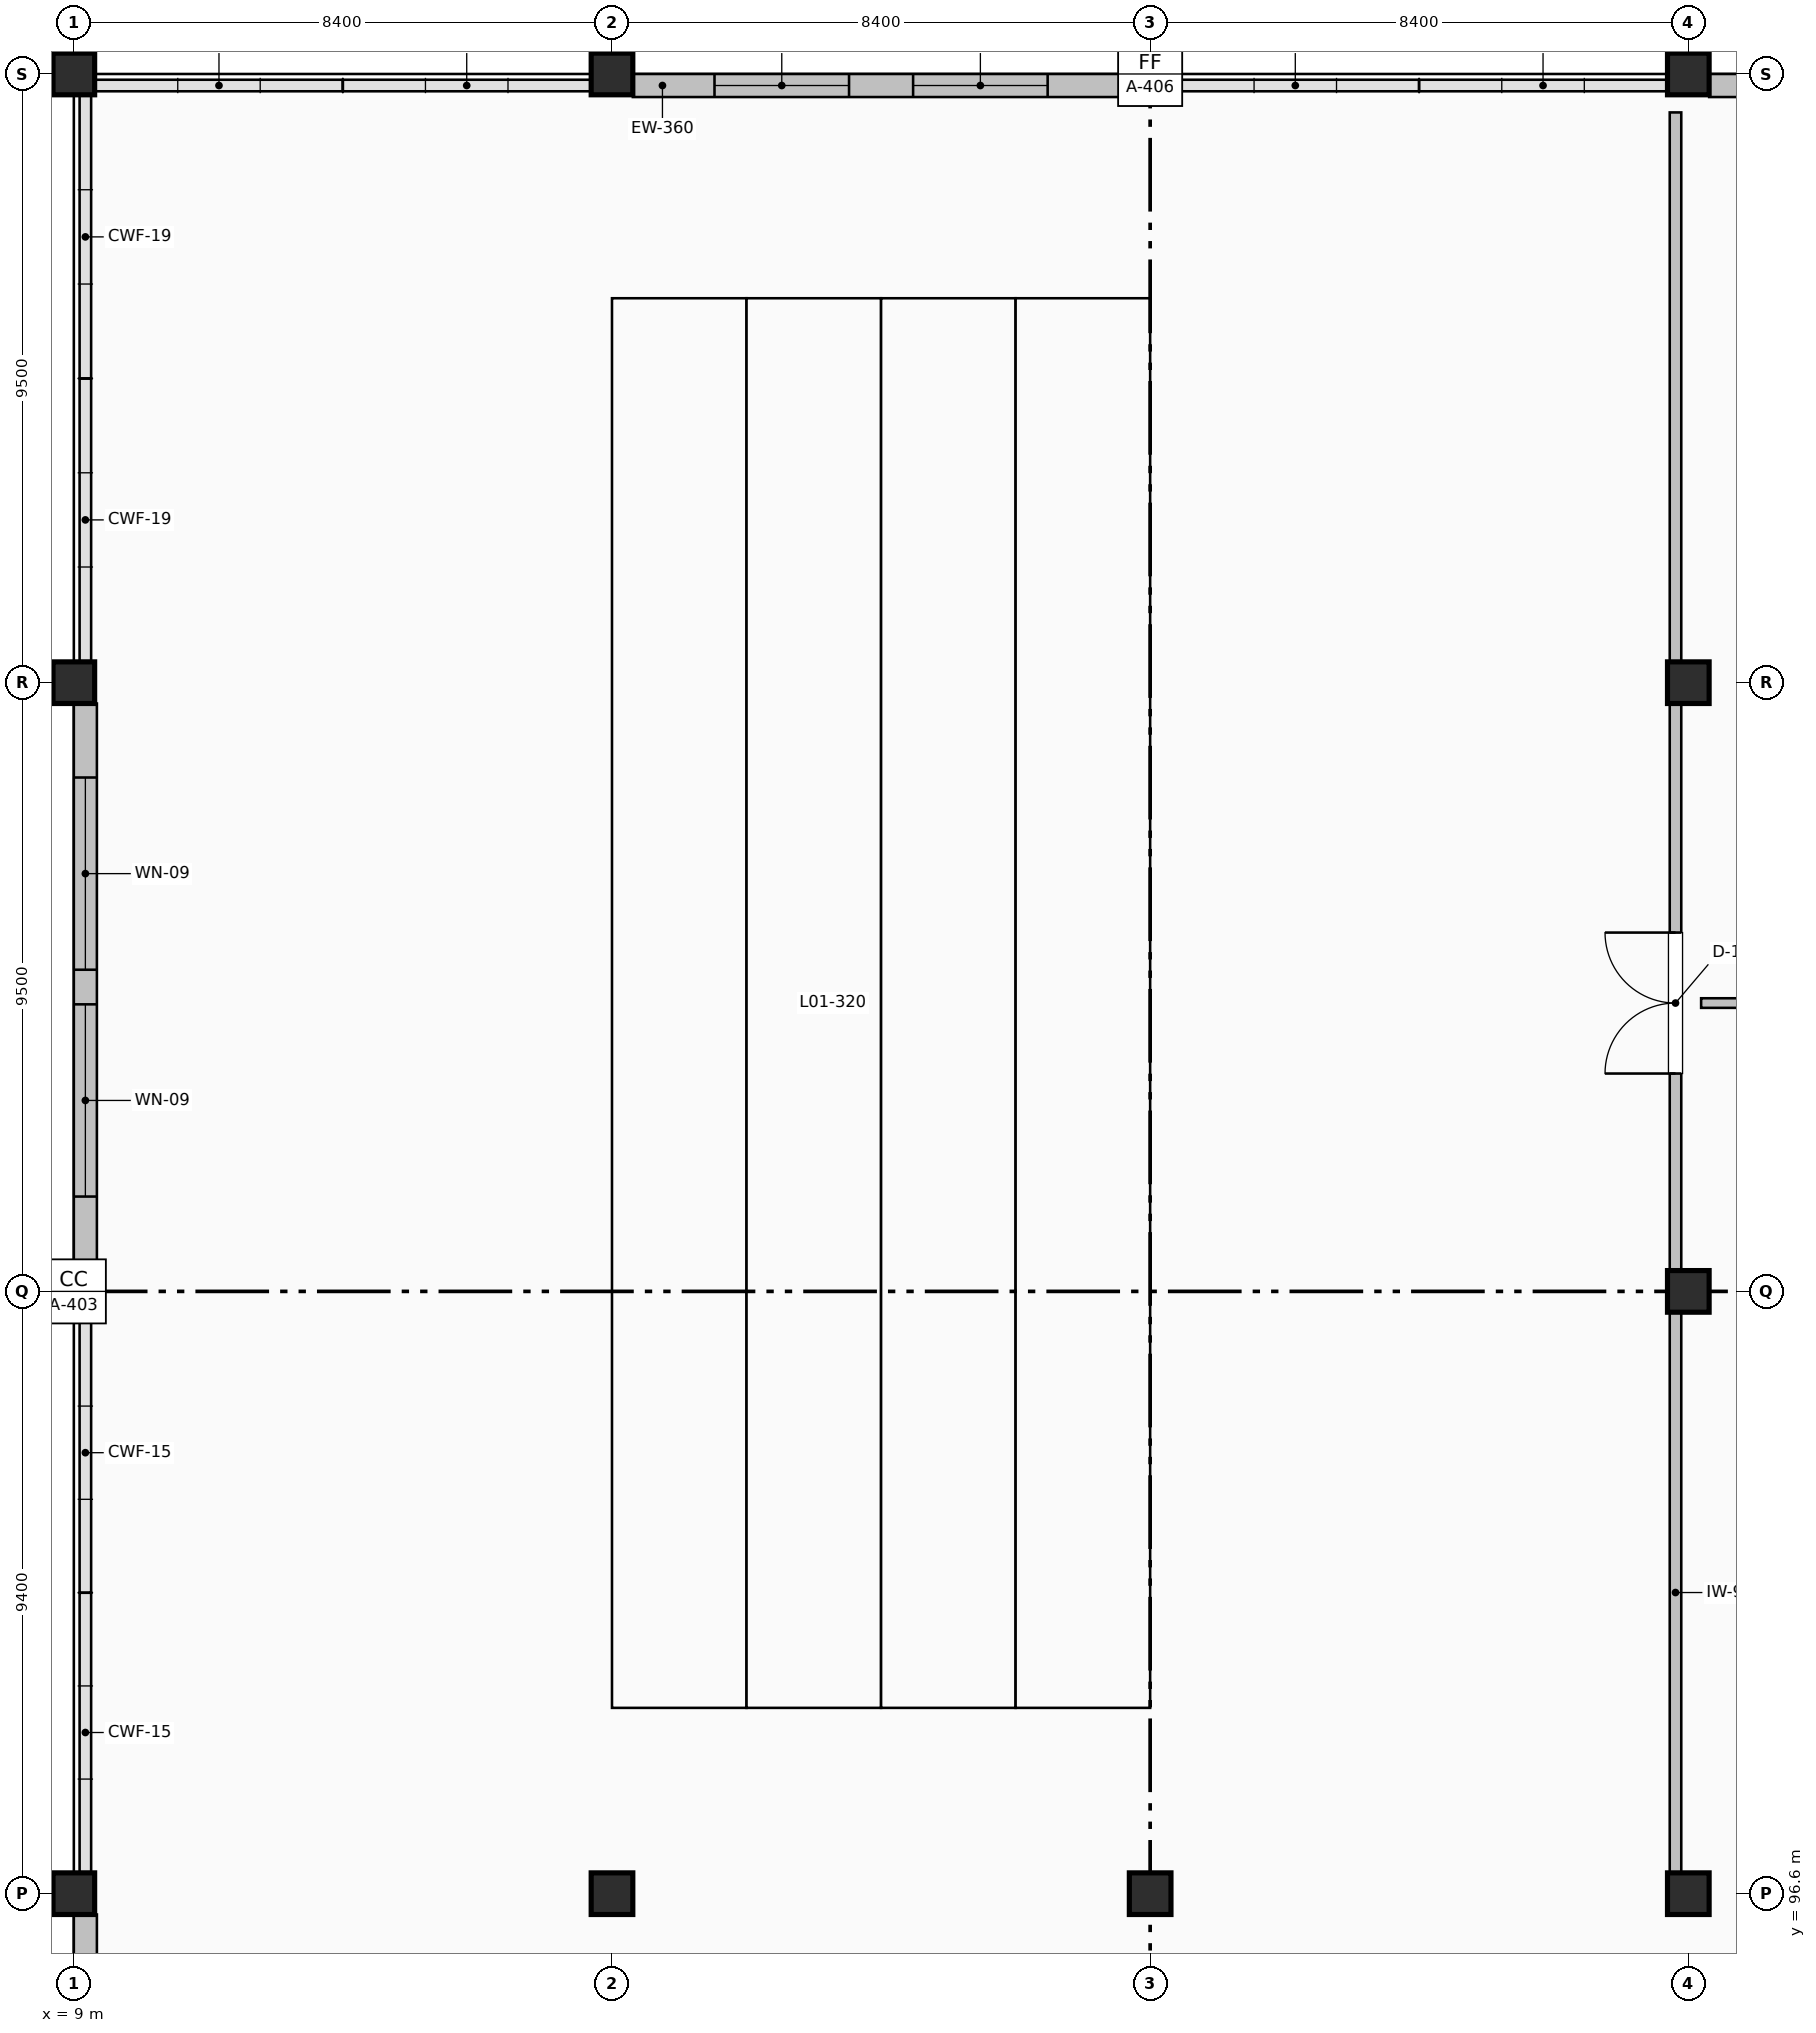
"""IFC4 building model, lengths in metres.
Left out: names, types, materials, properties, quantities, classifications, styles, units other than length and angle.
Written with IfcOpenShell. Run it as: python <this file> out.ifc"""

import sys

from ifc_helpers import new_model, si_unit, direction, frame, frame_2d, origin, origin_2d, place, context, subcontext, project, spatial, rectangle, extrude, element, fill, save


model = new_model("IFC4")
c1 = context("Model", 3, precision=1e-05, world=origin(), true_north=direction((0.0, 1.0)))
c2 = subcontext(c1, "Body", "Model", "MODEL_VIEW")
j1 = project(units=[si_unit("LENGTHUNIT", "METRE"), si_unit("PLANEANGLEUNIT", "RADIAN")], contexts=[c1])
p1 = place(None, origin())
s1 = spatial("IfcSite", under=j1, at=p1, CompositionType="ELEMENT")
p2 = place(p1, origin())
s2 = spatial("IfcBuilding", under=s1, at=p2, CompositionType="ELEMENT")
p3 = place(p2, frame((0.0, 0.0, 5.4)))
s3 = spatial("IfcBuildingStorey", under=s2, at=p3, CompositionType="ELEMENT", Elevation=5.4)
for number, where, z_axis, x_axis in (
    (1, (9.0, 96.6, 0.0), (0.0, 0.0, 1.0), (1.0, 0.0, 0.0)),
    (2, (9.0, 106.0, 0.0), (0.0, 0.0, 1.0), (1.0, 0.0, 0.0)),
    (3, (9.0, 115.5, 0.0), (0.0, 0.0, 1.0), (1.0, 0.0, 0.0)),
    (4, (9.0, 125.0, 0.0), (0.0, 0.0, 1.0), (1.0, 0.0, 0.0)),
    (5, (17.4, 96.6, 0.0), (0.0, 0.0, 1.0), (1.0, 0.0, 0.0)),
    (6, (17.4, 125.0, 0.0), (0.0, 0.0, 1.0), (1.0, 0.0, 0.0)),
    (7, (25.8, 96.6, 0.0), (0.0, 0.0, 1.0), (1.0, 0.0, 0.0)),
    (8, (25.8, 125.0, 0.0), (0.0, 0.0, 1.0), (1.0, 0.0, 0.0)),
    (9, (34.2, 96.6, 0.0), (0.0, 0.0, 1.0), (1.0, 0.0, 0.0)),
    (10, (34.2, 106.0, 0.0), (0.0, 0.0, 1.0), (1.0, 0.0, 0.0)),
    (11, (34.2, 115.5, 0.0), (0.0, 0.0, 1.0), (1.0, 0.0, 0.0)),
    (12, (34.2, 125.0, 0.0), (0.0, 0.0, 1.0), (1.0, 0.0, 0.0)),
):
    element("IfcColumn", number, at=place(p3, frame(where, z_axis=z_axis, x_axis=x_axis)), inside=s3, PredefinedType="COLUMN", context=c2, shape_type="SweptSolid", body=[
        extrude(rectangle(XDim=0.65, YDim=0.65, at=origin_2d()), origin(), (0.0, 0.0, 1.0), 4.8),
    ])
p4 = place(p3, frame((17.725, 124.82, 0.0), z_axis=(0.0, 0.0, 1.0), x_axis=(1.0, 0.0, 0.0)))
e13 = element("IfcWall", 13, at=p4, inside=s3, PredefinedType="SOLIDWALL", context=c2, shape_type="SweptSolid", body=[
    extrude(rectangle(XDim=7.75, YDim=0.36, at=frame_2d((3.875, 0.0))), origin(), (0.0, 0.0, 1.0), 3.592),
])
p5 = place(p4, frame((1.275, 0.0, 0.9)))
e14 = element("IfcOpeningElement", 14, at=p5, cuts=e13, PredefinedType="OPENING", context=c2, shape_type="SweptSolid", body=[
    extrude(rectangle(XDim=2.1, YDim=2.1, at=frame_2d((1.05, 1.05))), frame((0.0, 0.19, 0.0), z_axis=(0.0, -1.0, 0.0), x_axis=(1.0, 0.0, 0.0)), (0.0, 0.0, 1.0), 0.38),
])
p6 = place(p4, frame((4.375, 0.0, 0.9)))
e15 = element("IfcOpeningElement", 15, at=p6, cuts=e13, PredefinedType="OPENING", context=c2, shape_type="SweptSolid", body=[
    extrude(rectangle(XDim=2.1, YDim=2.1, at=frame_2d((1.05, 1.05))), frame((0.0, 0.19, 0.0), z_axis=(0.0, -1.0, 0.0), x_axis=(1.0, 0.0, 0.0)), (0.0, 0.0, 1.0), 0.38),
])
p7 = place(p3, frame((34.525, 124.82, 0.0), z_axis=(0.0, 0.0, 1.0), x_axis=(1.0, 0.0, 0.0)))
e16 = element("IfcWall", 16, at=p7, inside=s3, PredefinedType="SOLIDWALL", context=c2, shape_type="SweptSolid", body=[
    extrude(rectangle(XDim=7.75, YDim=0.36, at=frame_2d((3.875, 0.0))), origin(), (0.0, 0.0, 1.0), 3.592),
])
p8 = place(p7, frame((1.575, 0.0, 0.9)))
e17 = element("IfcOpeningElement", 17, at=p8, cuts=e16, PredefinedType="OPENING", context=c2, shape_type="SweptSolid", body=[
    extrude(rectangle(XDim=1.5, YDim=2.1, at=frame_2d((0.75, 1.05))), frame((0.0, 0.19, 0.0), z_axis=(0.0, -1.0, 0.0), x_axis=(1.0, 0.0, 0.0)), (0.0, 0.0, 1.0), 0.38),
])
p9 = place(p7, frame((4.675, 0.0, 0.9)))
e18 = element("IfcOpeningElement", 18, at=p9, cuts=e16, PredefinedType="OPENING", context=c2, shape_type="SweptSolid", body=[
    extrude(rectangle(XDim=1.5, YDim=2.1, at=frame_2d((0.75, 1.05))), frame((0.0, 0.19, 0.0), z_axis=(0.0, -1.0, 0.0), x_axis=(1.0, 0.0, 0.0)), (0.0, 0.0, 1.0), 0.38),
])
p10 = place(p3, frame((9.18, 87.61, 0.0), z_axis=(0.0, 0.0, 1.0), x_axis=(0.0, 1.0, 0.0)))
e19 = element("IfcWall", 19, at=p10, inside=s3, PredefinedType="SOLIDWALL", context=c2, shape_type="SweptSolid", body=[
    extrude(rectangle(XDim=8.665, YDim=0.36, at=frame_2d((4.333, 0.0))), origin(), (0.0, 0.0, 1.0), 3.592),
])
p11 = place(p10, frame((1.25, 0.0, 0.9)))
e20 = element("IfcOpeningElement", 20, at=p11, cuts=e19, PredefinedType="OPENING", context=c2, shape_type="SweptSolid", body=[
    extrude(rectangle(XDim=2.7, YDim=2.1, at=frame_2d((1.35, 1.05))), frame((0.0, 0.19, 0.0), z_axis=(0.0, -1.0, 0.0), x_axis=(1.0, 0.0, 0.0)), (0.0, 0.0, 1.0), 0.38),
])
p12 = place(p10, frame((4.716, 0.0, 0.9)))
e21 = element("IfcOpeningElement", 21, at=p12, cuts=e19, PredefinedType="OPENING", context=c2, shape_type="SweptSolid", body=[
    extrude(rectangle(XDim=2.7, YDim=2.1, at=frame_2d((1.35, 1.05))), frame((0.0, 0.19, 0.0), z_axis=(0.0, -1.0, 0.0), x_axis=(1.0, 0.0, 0.0)), (0.0, 0.0, 1.0), 0.38),
])
p13 = place(p3, frame((9.18, 106.325, 0.0), z_axis=(0.0, 0.0, 1.0), x_axis=(0.0, 1.0, 0.0)))
e22 = element("IfcWall", 22, at=p13, inside=s3, PredefinedType="SOLIDWALL", context=c2, shape_type="SweptSolid", body=[
    extrude(rectangle(XDim=8.85, YDim=0.36, at=frame_2d((4.425, 0.0))), origin(), (0.0, 0.0, 1.0), 3.592),
])
p14 = place(p13, frame((1.155, 0.0, 0.9)))
e23 = element("IfcOpeningElement", 23, at=p14, cuts=e22, PredefinedType="OPENING", context=c2, shape_type="SweptSolid", body=[
    extrude(rectangle(XDim=3.0, YDim=2.1, at=frame_2d((1.5, 1.05))), frame((0.0, 0.19, 0.0), z_axis=(0.0, -1.0, 0.0), x_axis=(1.0, 0.0, 0.0)), (0.0, 0.0, 1.0), 0.38),
])
p15 = place(p13, frame((4.695, 0.0, 0.9)))
e24 = element("IfcOpeningElement", 24, at=p15, cuts=e22, PredefinedType="OPENING", context=c2, shape_type="SweptSolid", body=[
    extrude(rectangle(XDim=3.0, YDim=2.1, at=frame_2d((1.5, 1.05))), frame((0.0, 0.19, 0.0), z_axis=(0.0, -1.0, 0.0), x_axis=(1.0, 0.0, 0.0)), (0.0, 0.0, 1.0), 0.38),
])
p16 = place(p3, frame((34.0, 96.925, 0.0), z_axis=(0.0, 0.0, 1.0), x_axis=(0.0, 1.0, 0.0)))
e25 = element("IfcWall", 25, at=p16, inside=s3, PredefinedType="PARTITIONING", context=c2, shape_type="SweptSolid", body=[
    extrude(rectangle(XDim=8.75, YDim=0.18, at=frame_2d((4.375, 0.0))), origin(), (0.0, 0.0, 1.0), 3.592),
])
p17 = place(p3, frame((34.0, 106.325, 0.0), z_axis=(0.0, 0.0, 1.0), x_axis=(0.0, 1.0, 0.0)))
e26 = element("IfcWall", 26, at=p17, inside=s3, PredefinedType="PARTITIONING", context=c2, shape_type="SweptSolid", body=[
    extrude(rectangle(XDim=8.85, YDim=0.18, at=frame_2d((4.425, 0.0))), origin(), (0.0, 0.0, 1.0), 3.592),
])
p18 = place(p17, frame((3.075, 0.0, 0.0)))
e27 = element("IfcOpeningElement", 27, at=p18, cuts=e26, PredefinedType="OPENING", context=c2, shape_type="SweptSolid", body=[
    extrude(rectangle(XDim=2.2, YDim=2.32, at=frame_2d((1.1, 1.16))), frame((0.0, 0.1, 0.0), z_axis=(0.0, -1.0, 0.0), x_axis=(1.0, 0.0, 0.0)), (0.0, 0.0, 1.0), 0.2),
])
p19 = place(p3, frame((34.0, 115.825, 0.0), z_axis=(0.0, 0.0, 1.0), x_axis=(0.0, 1.0, 0.0)))
e28 = element("IfcWall", 28, at=p19, inside=s3, PredefinedType="PARTITIONING", context=c2, shape_type="SweptSolid", body=[
    extrude(rectangle(XDim=8.575, YDim=0.18, at=frame_2d((4.288, 0.0))), origin(), (0.0, 0.0, 1.0), 3.592),
])
p20 = place(p3, frame((34.4, 110.5, 0.0), z_axis=(0.0, 0.0, 1.0), x_axis=(1.0, 0.0, 0.0)))
e29 = element("IfcWall", 29, at=p20, inside=s3, PredefinedType="PARTITIONING", context=c2, shape_type="SweptSolid", body=[
    extrude(rectangle(XDim=16.0, YDim=0.15, at=frame_2d((8.0, 0.0))), origin(), (0.0, 0.0, 1.0), 4.492),
])
p21 = place(p5, origin())
e30 = element("IfcWindow", 30, at=p21, inside=s3, PartitioningType="SINGLE_PANEL", PredefinedType="WINDOW", context=c2, shape_type="SweptSolid", body=[
    extrude(rectangle(XDim=2.1, YDim=2.1, at=frame_2d((1.05, 1.05))), frame((0.0, 0.03, 0.0), z_axis=(0.0, -1.0, 0.0), x_axis=(1.0, 0.0, 0.0)), (0.0, 0.0, 1.0), 0.06),
])
fill(e14, e30)
p22 = place(p6, origin())
e31 = element("IfcWindow", 31, at=p22, inside=s3, PartitioningType="SINGLE_PANEL", PredefinedType="WINDOW", context=c2, shape_type="SweptSolid", body=[
    extrude(rectangle(XDim=2.1, YDim=2.1, at=frame_2d((1.05, 1.05))), frame((0.0, 0.03, 0.0), z_axis=(0.0, -1.0, 0.0), x_axis=(1.0, 0.0, 0.0)), (0.0, 0.0, 1.0), 0.06),
])
fill(e15, e31)
p23 = place(p14, origin())
e32 = element("IfcWindow", 32, at=p23, inside=s3, PartitioningType="SINGLE_PANEL", PredefinedType="WINDOW", context=c2, shape_type="SweptSolid", body=[
    extrude(rectangle(XDim=3.0, YDim=2.1, at=frame_2d((1.5, 1.05))), frame((0.0, 0.03, 0.0), z_axis=(0.0, -1.0, 0.0), x_axis=(1.0, 0.0, 0.0)), (0.0, 0.0, 1.0), 0.06),
])
fill(e23, e32)
p24 = place(p15, origin())
e33 = element("IfcWindow", 33, at=p24, inside=s3, PartitioningType="SINGLE_PANEL", PredefinedType="WINDOW", context=c2, shape_type="SweptSolid", body=[
    extrude(rectangle(XDim=3.0, YDim=2.1, at=frame_2d((1.5, 1.05))), frame((0.0, 0.03, 0.0), z_axis=(0.0, -1.0, 0.0), x_axis=(1.0, 0.0, 0.0)), (0.0, 0.0, 1.0), 0.06),
])
fill(e24, e33)
p25 = place(p18, origin())
e34 = element("IfcDoor", 34, at=p25, inside=s3, OperationType="DOUBLE_DOOR_SINGLE_SWING", PredefinedType="DOOR", context=c2, shape_type="SweptSolid", body=[
    extrude(rectangle(XDim=2.2, YDim=2.32, at=frame_2d((1.1, 1.16))), frame((0.0, 0.025, 0.0), z_axis=(0.0, -1.0, 0.0), x_axis=(1.0, 0.0, 0.0)), (0.0, 0.0, 1.0), 0.05),
])
fill(e27, e34)
save(model, sys.argv[1])
